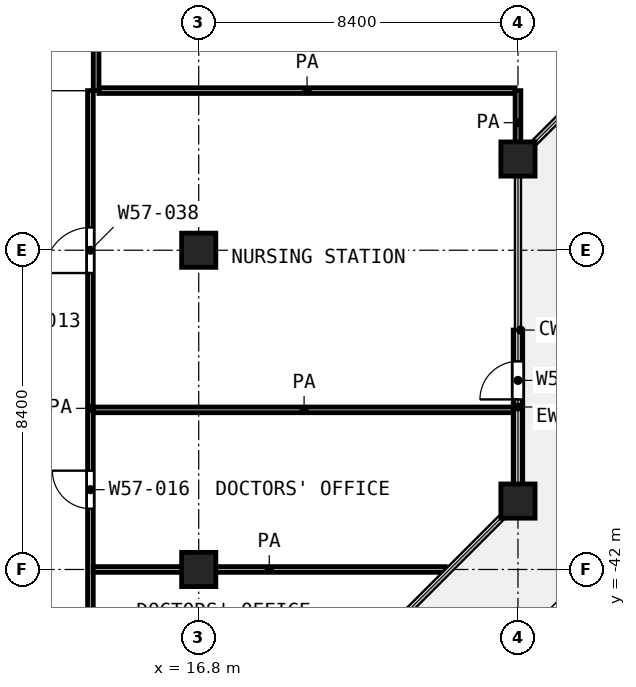
"""IFC4 building model, lengths in metres.
Left out: names, types, materials, properties, quantities, classifications, styles, units other than length and angle.
Written with IfcOpenShell. Run it as: python <this file> out.ifc"""

import sys

from ifc_helpers import new_model, si_unit, direction, frame, frame_2d, origin, origin_2d, place, context, subcontext, project, spatial, rectangle, extrude, element, fill, save


model = new_model("IFC4")
c1 = context("Model", 3, precision=1e-05, world=origin(), true_north=direction((0.0, 1.0)))
c2 = subcontext(c1, "Body", "Model", "MODEL_VIEW")
j1 = project(units=[si_unit("LENGTHUNIT", "METRE"), si_unit("PLANEANGLEUNIT", "RADIAN")], contexts=[c1])
p1 = place(None, origin())
s1 = spatial("IfcSite", under=j1, at=p1, CompositionType="ELEMENT")
p2 = place(p1, origin())
s2 = spatial("IfcBuilding", under=s1, at=p2, CompositionType="ELEMENT")
p3 = place(p2, frame((0.0, 0.0, 268.4)))
s3 = spatial("IfcBuildingStorey", under=s2, at=p3, CompositionType="ELEMENT", Elevation=268.4)
for number, where, z_axis, x_axis in (
    (1, (25.2, -31.2, 0.0), (0.0, 0.0, 1.0), (1.0, 0.0, 0.0)),
    (2, (16.8, -33.6, 0.0), (0.0, 0.0, 1.0), (1.0, 0.0, 0.0)),
    (3, (25.2, -40.2, 0.0), (0.0, 0.0, 1.0), (1.0, 0.0, 0.0)),
    (4, (16.8, -42.0, 0.0), (0.0, 0.0, 1.0), (1.0, 0.0, 0.0)),
):
    element("IfcColumn", number, at=place(p3, frame(where, z_axis=z_axis, x_axis=x_axis)), inside=s3, PredefinedType="COLUMN", context=c2, shape_type="SweptSolid", body=[
        extrude(rectangle(XDim=0.9, YDim=0.9, at=origin_2d()), origin(), (0.0, 0.0, 1.0), 4.2),
    ])
p4 = place(p3, frame((25.2, -39.75, 0.0), z_axis=(0.0, 0.0, 1.0), x_axis=(0.0, 1.0, 0.0)))
e5 = element("IfcWall", 5, at=p4, inside=s3, PredefinedType="SOLIDWALL", context=c2, shape_type="SweptSolid", body=[
    extrude(rectangle(XDim=4.05, YDim=0.25, at=frame_2d((2.025, 0.0))), origin(), (0.0, 0.0, 1.0), 3.58),
])
p5 = place(p4, frame((2.225, 0.0, 0.0)))
e6 = element("IfcOpeningElement", 6, at=p5, cuts=e5, PredefinedType="OPENING", context=c2, shape_type="SweptSolid", body=[
    extrude(rectangle(XDim=1.0, YDim=2.1, at=frame_2d((0.5, 1.05))), frame((0.0, 0.135, 0.0), z_axis=(0.0, -1.0, 0.0), x_axis=(1.0, 0.0, 0.0)), (0.0, 0.0, 1.0), 0.27),
])
p6 = place(p3, frame((14.025, -42.0, 0.0), z_axis=(0.0, 0.0, 1.0), x_axis=(1.0, 0.0, 0.0)))
e7 = element("IfcWall", 7, at=p6, inside=s3, PredefinedType="PARTITIONING", context=c2, shape_type="SweptSolid", body=[
    extrude(rectangle(XDim=9.262, YDim=0.15, at=frame_2d((4.631, 0.0))), origin(), (0.0, 0.0, 1.0), 3.7),
])
p7 = place(p3, frame((14.025, -37.8, 0.0), z_axis=(0.0, 0.0, 1.0), x_axis=(1.0, 0.0, 0.0)))
e8 = element("IfcWall", 8, at=p7, inside=s3, PredefinedType="PARTITIONING", context=c2, shape_type="SweptSolid", body=[
    extrude(rectangle(XDim=11.095, YDim=0.15, at=frame_2d((5.548, 0.0))), origin(), (0.0, 0.0, 1.0), 3.7),
])
p8 = place(p3, frame((14.175, -29.4, 0.0), z_axis=(0.0, 0.0, 1.0), x_axis=(1.0, 0.0, 0.0)))
e9 = element("IfcWall", 9, at=p8, inside=s3, PredefinedType="PARTITIONING", context=c2, shape_type="SweptSolid", body=[
    extrude(rectangle(XDim=10.95, YDim=0.15, at=frame_2d((5.475, 0.0))), origin(), (0.0, 0.0, 1.0), 3.7),
])
p9 = place(p3, frame((13.95, -46.12, 0.0), z_axis=(0.0, 0.0, 1.0), x_axis=(0.0, 1.0, 0.0)))
e10 = element("IfcWall", 10, at=p9, inside=s3, PredefinedType="PARTITIONING", context=c2, shape_type="SweptSolid", body=[
    extrude(rectangle(XDim=16.72, YDim=0.15, at=frame_2d((8.36, 0.0))), origin(), (0.0, 0.0, 1.0), 3.7),
])
p10 = place(p9, frame((11.92, 0.0, 0.0)))
e11 = element("IfcOpeningElement", 11, at=p10, cuts=e10, PredefinedType="OPENING", context=c2, shape_type="SweptSolid", body=[
    extrude(rectangle(XDim=1.2, YDim=2.1, at=frame_2d((0.6, 1.05))), frame((0.0, 0.085, 0.0), z_axis=(0.0, -1.0, 0.0), x_axis=(1.0, 0.0, 0.0)), (0.0, 0.0, 1.0), 0.17),
])
p11 = place(p9, frame((5.72, 0.0, 0.0)))
e12 = element("IfcOpeningElement", 12, at=p11, cuts=e10, PredefinedType="OPENING", context=c2, shape_type="SweptSolid", body=[
    extrude(rectangle(XDim=1.0, YDim=2.1, at=frame_2d((0.5, 1.05))), frame((0.0, 0.085, 0.0), z_axis=(0.0, -1.0, 0.0), x_axis=(1.0, 0.0, 0.0)), (0.0, 0.0, 1.0), 0.17),
])
p12 = place(p9, frame((1.52, 0.0, 0.0)))
e13 = element("IfcOpeningElement", 13, at=p12, cuts=e10, PredefinedType="OPENING", context=c2, shape_type="SweptSolid", body=[
    extrude(rectangle(XDim=1.0, YDim=2.1, at=frame_2d((0.5, 1.05))), frame((0.0, 0.085, 0.0), z_axis=(0.0, -1.0, 0.0), x_axis=(1.0, 0.0, 0.0)), (0.0, 0.0, 1.0), 0.17),
])
p13 = place(p3, frame((14.1, -29.4, 0.0), z_axis=(0.0, 0.0, 1.0), x_axis=(0.0, 1.0, 0.0)))
e14 = element("IfcWall", 14, at=p13, inside=s3, PredefinedType="PARTITIONING", context=c2, shape_type="SweptSolid", body=[
    extrude(rectangle(XDim=4.6, YDim=0.15, at=frame_2d((2.3, 0.0))), origin(), (0.0, 0.0, 1.0), 3.7),
])
p14 = place(p3, frame((25.2, -31.087, 0.0), z_axis=(0.0, 0.0, 1.0), x_axis=(0.0, 1.0, 0.0)))
e15 = element("IfcWall", 15, at=p14, inside=s3, PredefinedType="PARTITIONING", context=c2, shape_type="SweptSolid", body=[
    extrude(rectangle(XDim=1.687, YDim=0.15, at=frame_2d((0.844, 0.0))), origin(), (0.0, 0.0, 1.0), 3.7),
])
p15 = place(p5, origin())
e16 = element("IfcDoor", 16, at=p15, inside=s3, OperationType="SINGLE_SWING_LEFT", PredefinedType="DOOR", context=c2, shape_type="SweptSolid", body=[
    extrude(rectangle(XDim=1.0, YDim=2.1, at=frame_2d((0.5, 1.05))), frame((0.0, 0.025, 0.0), z_axis=(0.0, -1.0, 0.0), x_axis=(1.0, 0.0, 0.0)), (0.0, 0.0, 1.0), 0.05),
])
fill(e6, e16)
p16 = place(p10, origin())
e17 = element("IfcDoor", 17, at=p16, inside=s3, OperationType="SINGLE_SWING_LEFT", PredefinedType="DOOR", context=c2, shape_type="SweptSolid", body=[
    extrude(rectangle(XDim=1.2, YDim=2.1, at=frame_2d((0.6, 1.05))), frame((0.0, 0.025, 0.0), z_axis=(0.0, -1.0, 0.0), x_axis=(1.0, 0.0, 0.0)), (0.0, 0.0, 1.0), 0.05),
])
fill(e11, e17)
p17 = place(p11, origin())
e18 = element("IfcDoor", 18, at=p17, inside=s3, OperationType="SINGLE_SWING_RIGHT", PredefinedType="DOOR", context=c2, shape_type="SweptSolid", body=[
    extrude(rectangle(XDim=1.0, YDim=2.1, at=frame_2d((0.5, 1.05))), frame((0.0, 0.025, 0.0), z_axis=(0.0, -1.0, 0.0), x_axis=(1.0, 0.0, 0.0)), (0.0, 0.0, 1.0), 0.05),
])
fill(e12, e18)
save(model, sys.argv[1])
